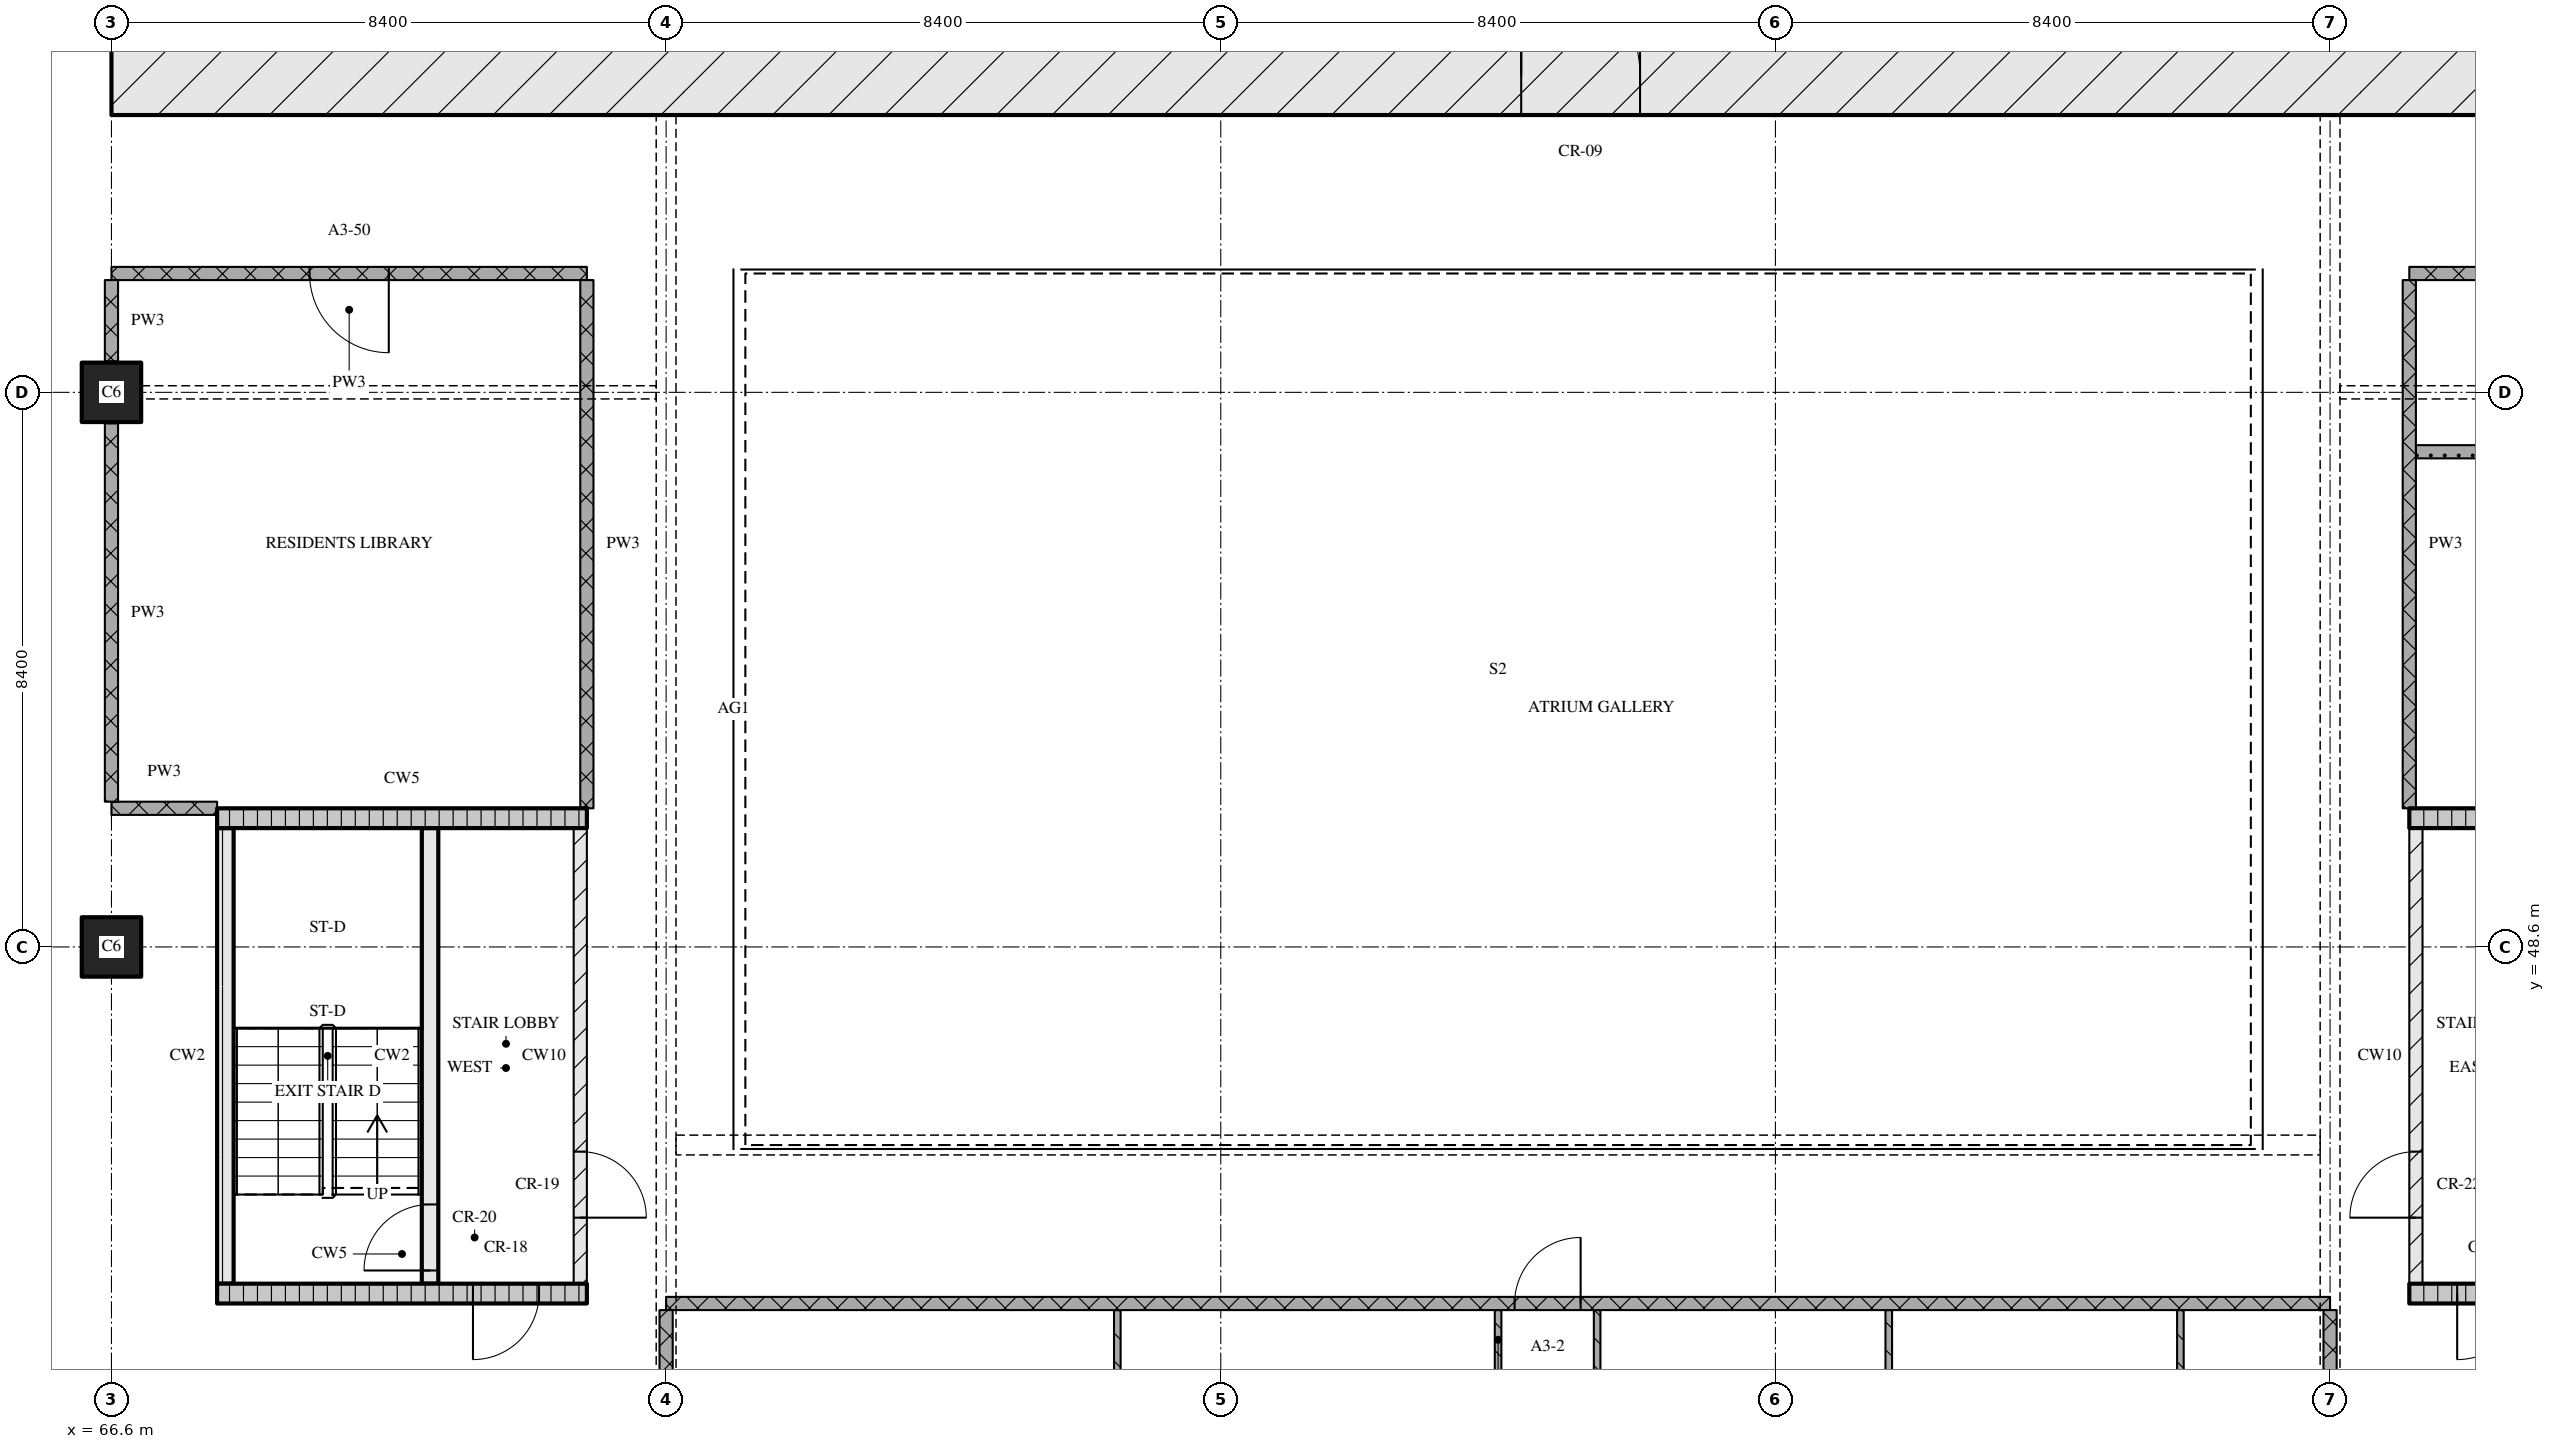
"""IFC4 building model, lengths in metres.
Left out: names, types, materials, properties, quantities, classifications, styles, units other than length and angle.
Written with IfcOpenShell. Run it as: python <this file> out.ifc"""

import sys

from ifc_helpers import new_model, si_unit, direction, frame, frame_2d, origin, origin_2d, place, context, subcontext, project, spatial, rectangle, extrude, element, fill, save


model = new_model("IFC4")
c1 = context("Model", 3, precision=1e-05, world=origin(), true_north=direction((0.0, 1.0)))
c2 = subcontext(c1, "Body", "Model", "MODEL_VIEW")
j1 = project(units=[si_unit("LENGTHUNIT", "METRE"), si_unit("PLANEANGLEUNIT", "RADIAN")], contexts=[c1])
p1 = place(None, origin())
s1 = spatial("IfcSite", under=j1, at=p1, CompositionType="ELEMENT")
p2 = place(p1, origin())
s2 = spatial("IfcBuilding", under=s1, at=p2, CompositionType="ELEMENT")
p3 = place(p2, frame((0.0, 0.0, 58.8)))
s3 = spatial("IfcBuildingStorey", under=s2, at=p3, CompositionType="ELEMENT", Elevation=58.8)
for number, where, z_axis, x_axis in (
    (1, (66.6, 48.6, 0.0), (0.0, 0.0, 1.0), (1.0, 0.0, 0.0)),
    (2, (66.6, 57.0, 0.0), (0.0, 0.0, 1.0), (1.0, 0.0, 0.0)),
):
    element("IfcColumn", number, at=place(p3, frame(where, z_axis=z_axis, x_axis=x_axis)), inside=s3, PredefinedType="COLUMN", context=c2, shape_type="SweptSolid", body=[
        extrude(rectangle(XDim=0.9, YDim=0.9, at=origin_2d()), origin(), (0.0, 0.0, 1.0), 3.6),
    ])
p4 = place(p3, frame((66.6, 61.8, 0.0), z_axis=(0.0, 0.0, 1.0), x_axis=(1.0, 0.0, 0.0)))
e3 = element("IfcWall", 3, at=p4, inside=s3, PredefinedType="SOLIDWALL", context=c2, shape_type="SweptSolid", body=[
    extrude(rectangle(XDim=42.0, YDim=1.2, at=frame_2d((21.0, 0.0))), origin(), (0.0, 0.0, 1.0), 3.32),
])
p5 = place(p4, frame((21.35, 0.0, 0.0)))
e4 = element("IfcOpeningElement", 4, at=p5, cuts=e3, PredefinedType="OPENING", context=c2, shape_type="SweptSolid", body=[
    extrude(rectangle(XDim=1.8, YDim=2.1, at=frame_2d((0.9, 1.05))), frame((0.0, 0.61, 0.0), z_axis=(0.0, -1.0, 0.0), x_axis=(1.0, 0.0, 0.0)), (0.0, 0.0, 1.0), 1.22),
])
p6 = place(p3, frame((68.2, 43.35, 0.0), z_axis=(0.0, 0.0, 1.0), x_axis=(1.0, 0.0, 0.0)))
e5 = element("IfcWall", 5, at=p6, inside=s3, PredefinedType="SOLIDWALL", context=c2, shape_type="SweptSolid", body=[
    extrude(rectangle(XDim=5.6, YDim=0.3, at=frame_2d((2.8, 0.0))), origin(), (0.0, 0.0, 1.0), 3.32),
])
p7 = place(p6, frame((3.875, 0.0, 0.0)))
e6 = element("IfcOpeningElement", 6, at=p7, cuts=e5, PredefinedType="OPENING", context=c2, shape_type="SweptSolid", body=[
    extrude(rectangle(XDim=1.0, YDim=2.1, at=frame_2d((0.5, 1.05))), frame((0.0, 0.16, 0.0), z_axis=(0.0, -1.0, 0.0), x_axis=(1.0, 0.0, 0.0)), (0.0, 0.0, 1.0), 0.32),
])
p8 = place(p3, frame((68.325, 43.5, 0.0), z_axis=(0.0, 0.0, 1.0), x_axis=(0.0, 1.0, 0.0)))
e7 = element("IfcWall", 7, at=p8, inside=s3, PredefinedType="SOLIDWALL", context=c2, shape_type="SweptSolid", body=[
    extrude(rectangle(XDim=6.9, YDim=0.25, at=frame_2d((3.45, 0.0))), origin(), (0.0, 0.0, 1.0), 3.32),
])
p9 = place(p3, frame((71.425, 43.5, 0.0), z_axis=(0.0, 0.0, 1.0), x_axis=(0.0, 1.0, 0.0)))
e8 = element("IfcWall", 8, at=p9, inside=s3, PredefinedType="SOLIDWALL", context=c2, shape_type="SweptSolid", body=[
    extrude(rectangle(XDim=6.9, YDim=0.25, at=frame_2d((3.45, 0.0))), origin(), (0.0, 0.0, 1.0), 3.32),
])
p10 = place(p9, frame((0.2, 0.0, 0.0)))
e9 = element("IfcOpeningElement", 9, at=p10, cuts=e8, PredefinedType="OPENING", context=c2, shape_type="SweptSolid", body=[
    extrude(rectangle(XDim=1.0, YDim=2.1, at=frame_2d((0.5, 1.05))), frame((0.0, 0.135, 0.0), z_axis=(0.0, -1.0, 0.0), x_axis=(1.0, 0.0, 0.0)), (0.0, 0.0, 1.0), 0.27),
])
p11 = place(p3, frame((73.7, 43.5, 0.0), z_axis=(0.0, 0.0, 1.0), x_axis=(0.0, 1.0, 0.0)))
e10 = element("IfcWall", 10, at=p11, inside=s3, PredefinedType="PARTITIONING", context=c2, shape_type="SweptSolid", body=[
    extrude(rectangle(XDim=6.9, YDim=0.2, at=frame_2d((3.45, 0.0))), origin(), (0.0, 0.0, 1.0), 3.32),
])
p12 = place(p11, frame((1.0, 0.0, 0.0)))
e11 = element("IfcOpeningElement", 11, at=p12, cuts=e10, PredefinedType="OPENING", context=c2, shape_type="SweptSolid", body=[
    extrude(rectangle(XDim=1.0, YDim=2.1, at=frame_2d((0.5, 1.05))), frame((0.0, 0.11, 0.0), z_axis=(0.0, -1.0, 0.0), x_axis=(1.0, 0.0, 0.0)), (0.0, 0.0, 1.0), 0.22),
])
p13 = place(p3, frame((68.2, 50.55, 0.0), z_axis=(0.0, 0.0, 1.0), x_axis=(1.0, 0.0, 0.0)))
e12 = element("IfcWall", 12, at=p13, inside=s3, PredefinedType="SOLIDWALL", context=c2, shape_type="SweptSolid", body=[
    extrude(rectangle(XDim=5.6, YDim=0.3, at=frame_2d((2.8, 0.0))), origin(), (0.0, 0.0, 1.0), 3.32),
])
p14 = place(p3, frame((101.4, 43.35, 0.0), z_axis=(0.0, 0.0, 1.0), x_axis=(1.0, 0.0, 0.0)))
e13 = element("IfcWall", 13, at=p14, inside=s3, PredefinedType="SOLIDWALL", context=c2, shape_type="SweptSolid", body=[
    extrude(rectangle(XDim=5.6, YDim=0.3, at=frame_2d((2.8, 0.0))), origin(), (0.0, 0.0, 1.0), 3.32),
])
p15 = place(p14, frame((0.725, 0.0, 0.0)))
e14 = element("IfcOpeningElement", 14, at=p15, cuts=e13, PredefinedType="OPENING", context=c2, shape_type="SweptSolid", body=[
    extrude(rectangle(XDim=1.0, YDim=2.1, at=frame_2d((0.5, 1.05))), frame((0.0, 0.16, 0.0), z_axis=(0.0, -1.0, 0.0), x_axis=(1.0, 0.0, 0.0)), (0.0, 0.0, 1.0), 0.32),
])
p16 = place(p3, frame((101.5, 43.5, 0.0), z_axis=(0.0, 0.0, 1.0), x_axis=(0.0, 1.0, 0.0)))
e15 = element("IfcWall", 15, at=p16, inside=s3, PredefinedType="PARTITIONING", context=c2, shape_type="SweptSolid", body=[
    extrude(rectangle(XDim=6.9, YDim=0.2, at=frame_2d((3.45, 0.0))), origin(), (0.0, 0.0, 1.0), 3.32),
])
p17 = place(p16, frame((1.0, 0.0, 0.0)))
e16 = element("IfcOpeningElement", 16, at=p17, cuts=e15, PredefinedType="OPENING", context=c2, shape_type="SweptSolid", body=[
    extrude(rectangle(XDim=1.0, YDim=2.1, at=frame_2d((0.5, 1.05))), frame((0.0, 0.11, 0.0), z_axis=(0.0, -1.0, 0.0), x_axis=(1.0, 0.0, 0.0)), (0.0, 0.0, 1.0), 0.22),
])
p18 = place(p3, frame((101.4, 50.55, 0.0), z_axis=(0.0, 0.0, 1.0), x_axis=(1.0, 0.0, 0.0)))
e17 = element("IfcWall", 17, at=p18, inside=s3, PredefinedType="SOLIDWALL", context=c2, shape_type="SweptSolid", body=[
    extrude(rectangle(XDim=5.6, YDim=0.3, at=frame_2d((2.8, 0.0))), origin(), (0.0, 0.0, 1.0), 3.32),
])
p19 = place(p3, frame((100.2, 43.2, 0.0), z_axis=(0.0, 0.0, 1.0), x_axis=(-1.0, 0.0, 0.0)))
e18 = element("IfcWall", 18, at=p19, inside=s3, PredefinedType="PARTITIONING", context=c2, shape_type="SweptSolid", body=[
    extrude(rectangle(XDim=25.2, YDim=0.2, at=frame_2d((12.6, 0.0))), origin(), (0.0, 0.0, 1.0), 3.32),
])
p20 = place(p19, frame((11.35, 0.0, 0.0)))
e19 = element("IfcOpeningElement", 19, at=p20, cuts=e18, PredefinedType="OPENING", context=c2, shape_type="SweptSolid", body=[
    extrude(rectangle(XDim=1.0, YDim=2.1, at=frame_2d((0.5, 1.05))), frame((0.0, 0.11, 0.0), z_axis=(0.0, -1.0, 0.0), x_axis=(1.0, 0.0, 0.0)), (0.0, 0.0, 1.0), 0.22),
])
p21 = place(p3, frame((66.6, 50.7, 0.0), z_axis=(0.0, 0.0, 1.0), x_axis=(1.0, 0.0, 0.0)))
e20 = element("IfcWall", 20, at=p21, inside=s3, PredefinedType="PARTITIONING", context=c2, shape_type="SweptSolid", body=[
    extrude(rectangle(XDim=1.6, YDim=0.2, at=frame_2d((0.8, 0.0))), origin(), (0.0, 0.0, 1.0), 3.32),
])
p22 = place(p3, frame((101.5, 56.1, 0.0), z_axis=(0.0, 0.0, 1.0), x_axis=(1.0, 0.0, 0.0)))
e21 = element("IfcWall", 21, at=p22, inside=s3, PredefinedType="PARTITIONING", context=c2, shape_type="SweptSolid", body=[
    extrude(rectangle(XDim=7.0, YDim=0.2, at=frame_2d((3.5, 0.0))), origin(), (0.0, 0.0, 1.0), 3.32),
])
p23 = place(p3, frame((73.8, 58.8, 0.0), z_axis=(0.0, 0.0, 1.0), x_axis=(-1.0, 0.0, 0.0)))
e22 = element("IfcWall", 22, at=p23, inside=s3, PredefinedType="PARTITIONING", context=c2, shape_type="SweptSolid", body=[
    extrude(rectangle(XDim=7.2, YDim=0.2, at=frame_2d((3.6, 0.0))), origin(), (0.0, 0.0, 1.0), 3.32),
])
p24 = place(p23, frame((3.0, 0.0, 0.0)))
e23 = element("IfcOpeningElement", 23, at=p24, cuts=e22, PredefinedType="OPENING", context=c2, shape_type="SweptSolid", body=[
    extrude(rectangle(XDim=1.2, YDim=2.1, at=frame_2d((0.6, 1.05))), frame((0.0, 0.11, 0.0), z_axis=(0.0, -1.0, 0.0), x_axis=(1.0, 0.0, 0.0)), (0.0, 0.0, 1.0), 0.22),
])
p25 = place(p3, frame((101.4, 58.8, 0.0), z_axis=(0.0, 0.0, 1.0), x_axis=(1.0, 0.0, 0.0)))
e24 = element("IfcWall", 24, at=p25, inside=s3, PredefinedType="PARTITIONING", context=c2, shape_type="SweptSolid", body=[
    extrude(rectangle(XDim=7.2, YDim=0.2, at=frame_2d((3.6, 0.0))), origin(), (0.0, 0.0, 1.0), 3.32),
])
p26 = place(p3, frame((66.6, 56.53, 0.0), z_axis=(0.0, 0.0, 1.0), x_axis=(0.0, -1.0, 0.0)))
e25 = element("IfcWall", 25, at=p26, inside=s3, PredefinedType="PARTITIONING", context=c2, shape_type="SweptSolid", body=[
    extrude(rectangle(XDim=5.73, YDim=0.2, at=frame_2d((2.865, 0.0))), origin(), (0.0, 0.0, 1.0), 3.32),
])
p27 = place(p3, frame((66.6, 58.7, 0.0), z_axis=(0.0, 0.0, 1.0), x_axis=(0.0, -1.0, 0.0)))
e26 = element("IfcWall", 26, at=p27, inside=s3, PredefinedType="PARTITIONING", context=c2, shape_type="SweptSolid", body=[
    extrude(rectangle(XDim=1.23, YDim=0.2, at=frame_2d((0.615, 0.0))), origin(), (0.0, 0.0, 1.0), 3.32),
])
p28 = place(p3, frame((73.8, 58.7, 0.0), z_axis=(0.0, 0.0, 1.0), x_axis=(0.0, -1.0, 0.0)))
e27 = element("IfcWall", 27, at=p28, inside=s3, PredefinedType="PARTITIONING", context=c2, shape_type="SweptSolid", body=[
    extrude(rectangle(XDim=8.0, YDim=0.2, at=frame_2d((4.0, 0.0))), origin(), (0.0, 0.0, 1.0), 3.32),
])
p29 = place(p3, frame((75.0, 43.1, 0.0), z_axis=(0.0, 0.0, 1.0), x_axis=(0.0, -1.0, 0.0)))
e28 = element("IfcWall", 28, at=p29, inside=s3, PredefinedType="PARTITIONING", context=c2, shape_type="SweptSolid", body=[
    extrude(rectangle(XDim=2.2, YDim=0.2, at=frame_2d((1.1, 0.0))), origin(), (0.0, 0.0, 1.0), 2.43),
])
p30 = place(p3, frame((81.833, 43.1, 0.0), z_axis=(0.0, 0.0, 1.0), x_axis=(0.0, -1.0, 0.0)))
e29 = element("IfcWall", 29, at=p30, inside=s3, PredefinedType="PARTITIONING", context=c2, shape_type="SweptSolid", body=[
    extrude(rectangle(XDim=5.85, YDim=0.1, at=frame_2d((2.925, 0.0))), origin(), (0.0, 0.0, 1.0), 3.32),
])
p31 = place(p3, frame((87.6, 37.25, 0.0), z_axis=(0.0, 0.0, 1.0), x_axis=(0.0, 1.0, 0.0)))
e30 = element("IfcWall", 30, at=p31, inside=s3, PredefinedType="PARTITIONING", context=c2, shape_type="SweptSolid", body=[
    extrude(rectangle(XDim=5.85, YDim=0.1, at=frame_2d((2.925, 0.0))), origin(), (0.0, 0.0, 1.0), 3.32),
])
p32 = place(p31, frame((2.5, 0.0, 0.0)))
e31 = element("IfcOpeningElement", 31, at=p32, cuts=e30, PredefinedType="OPENING", context=c2, shape_type="SweptSolid", body=[
    extrude(rectangle(XDim=0.9, YDim=2.1, at=frame_2d((0.45, 1.05))), frame((0.0, 0.06, 0.0), z_axis=(0.0, -1.0, 0.0), x_axis=(1.0, 0.0, 0.0)), (0.0, 0.0, 1.0), 0.12),
])
p33 = place(p3, frame((89.1, 43.1, 0.0), z_axis=(0.0, 0.0, 1.0), x_axis=(0.0, -1.0, 0.0)))
e32 = element("IfcWall", 32, at=p33, inside=s3, PredefinedType="PARTITIONING", context=c2, shape_type="SweptSolid", body=[
    extrude(rectangle(XDim=5.85, YDim=0.1, at=frame_2d((2.925, 0.0))), origin(), (0.0, 0.0, 1.0), 3.32),
])
p34 = place(p33, frame((2.5, 0.0, 0.0)))
e33 = element("IfcOpeningElement", 33, at=p34, cuts=e32, PredefinedType="OPENING", context=c2, shape_type="SweptSolid", body=[
    extrude(rectangle(XDim=0.8, YDim=2.1, at=frame_2d((0.4, 1.05))), frame((0.0, 0.06, 0.0), z_axis=(0.0, -1.0, 0.0), x_axis=(1.0, 0.0, 0.0)), (0.0, 0.0, 1.0), 0.12),
])
for number, where, z_axis, x_axis in (
    (34, (93.517, 43.1, 0.0), (0.0, 0.0, 1.0), (0.0, -1.0, 0.0)),
    (35, (97.933, 43.1, 0.0), (0.0, 0.0, 1.0), (0.0, -1.0, 0.0)),
):
    element("IfcWall", number, at=place(p3, frame(where, z_axis=z_axis, x_axis=x_axis)), inside=s3, PredefinedType="PARTITIONING", context=c2, shape_type="SweptSolid", body=[
        extrude(rectangle(XDim=5.85, YDim=0.1, at=frame_2d((2.925, 0.0))), origin(), (0.0, 0.0, 1.0), 3.32),
    ])
p35 = place(p3, frame((100.2, 43.1, 0.0), z_axis=(0.0, 0.0, 1.0), x_axis=(0.0, -1.0, 0.0)))
e36 = element("IfcWall", 36, at=p35, inside=s3, PredefinedType="PARTITIONING", context=c2, shape_type="SweptSolid", body=[
    extrude(rectangle(XDim=2.2, YDim=0.2, at=frame_2d((1.1, 0.0))), origin(), (0.0, 0.0, 1.0), 2.43),
])
p36 = place(p3, frame((101.4, 58.7, 0.0), z_axis=(0.0, 0.0, 1.0), x_axis=(0.0, -1.0, 0.0)))
e37 = element("IfcWall", 37, at=p36, inside=s3, PredefinedType="PARTITIONING", context=c2, shape_type="SweptSolid", body=[
    extrude(rectangle(XDim=8.0, YDim=0.2, at=frame_2d((4.0, 0.0))), origin(), (0.0, 0.0, 1.0), 3.32),
])
p37 = place(p5, origin())
e38 = element("IfcDoor", 38, at=p37, inside=s3, OperationType="DOUBLE_DOOR_SINGLE_SWING", PredefinedType="DOOR", context=c2, shape_type="SweptSolid", body=[
    extrude(rectangle(XDim=1.8, YDim=2.1, at=frame_2d((0.9, 1.05))), frame((0.0, 0.025, 0.0), z_axis=(0.0, -1.0, 0.0), x_axis=(1.0, 0.0, 0.0)), (0.0, 0.0, 1.0), 0.05),
])
fill(e4, e38)
p38 = place(p7, origin())
e39 = element("IfcDoor", 39, at=p38, inside=s3, OperationType="SINGLE_SWING_RIGHT", PredefinedType="DOOR", context=c2, shape_type="SweptSolid", body=[
    extrude(rectangle(XDim=1.0, YDim=2.1, at=frame_2d((0.5, 1.05))), frame((0.0, 0.025, 0.0), z_axis=(0.0, -1.0, 0.0), x_axis=(1.0, 0.0, 0.0)), (0.0, 0.0, 1.0), 0.05),
])
fill(e6, e39)
p39 = place(p10, origin())
e40 = element("IfcDoor", 40, at=p39, inside=s3, OperationType="SINGLE_SWING_LEFT", PredefinedType="DOOR", context=c2, shape_type="SweptSolid", body=[
    extrude(rectangle(XDim=1.0, YDim=2.1, at=frame_2d((0.5, 1.05))), frame((0.0, 0.025, 0.0), z_axis=(0.0, -1.0, 0.0), x_axis=(1.0, 0.0, 0.0)), (0.0, 0.0, 1.0), 0.05),
])
fill(e9, e40)
p40 = place(p12, origin())
e41 = element("IfcDoor", 41, at=p40, inside=s3, OperationType="SINGLE_SWING_RIGHT", PredefinedType="DOOR", context=c2, shape_type="SweptSolid", body=[
    extrude(rectangle(XDim=1.0, YDim=2.1, at=frame_2d((0.5, 1.05))), frame((0.0, 0.025, 0.0), z_axis=(0.0, -1.0, 0.0), x_axis=(1.0, 0.0, 0.0)), (0.0, 0.0, 1.0), 0.05),
])
fill(e11, e41)
p41 = place(p15, origin())
e42 = element("IfcDoor", 42, at=p41, inside=s3, OperationType="SINGLE_SWING_RIGHT", PredefinedType="DOOR", context=c2, shape_type="SweptSolid", body=[
    extrude(rectangle(XDim=1.0, YDim=2.1, at=frame_2d((0.5, 1.05))), frame((0.0, 0.025, 0.0), z_axis=(0.0, -1.0, 0.0), x_axis=(1.0, 0.0, 0.0)), (0.0, 0.0, 1.0), 0.05),
])
fill(e14, e42)
p42 = place(p17, origin())
e43 = element("IfcDoor", 43, at=p42, inside=s3, OperationType="SINGLE_SWING_LEFT", PredefinedType="DOOR", context=c2, shape_type="SweptSolid", body=[
    extrude(rectangle(XDim=1.0, YDim=2.1, at=frame_2d((0.5, 1.05))), frame((0.0, 0.025, 0.0), z_axis=(0.0, -1.0, 0.0), x_axis=(1.0, 0.0, 0.0)), (0.0, 0.0, 1.0), 0.05),
])
fill(e16, e43)
p43 = place(p20, origin())
e44 = element("IfcDoor", 44, at=p43, inside=s3, OperationType="SINGLE_SWING_RIGHT", PredefinedType="DOOR", context=c2, shape_type="SweptSolid", body=[
    extrude(rectangle(XDim=1.0, YDim=2.1, at=frame_2d((0.5, 1.05))), frame((0.0, 0.025, 0.0), z_axis=(0.0, -1.0, 0.0), x_axis=(1.0, 0.0, 0.0)), (0.0, 0.0, 1.0), 0.05),
])
fill(e19, e44)
p44 = place(p24, origin())
e45 = element("IfcDoor", 45, at=p44, inside=s3, OperationType="SINGLE_SWING_LEFT", PredefinedType="DOOR", context=c2, shape_type="SweptSolid", body=[
    extrude(rectangle(XDim=1.2, YDim=2.1, at=frame_2d((0.6, 1.05))), frame((0.0, 0.025, 0.0), z_axis=(0.0, -1.0, 0.0), x_axis=(1.0, 0.0, 0.0)), (0.0, 0.0, 1.0), 0.05),
])
fill(e23, e45)
save(model, sys.argv[1])
